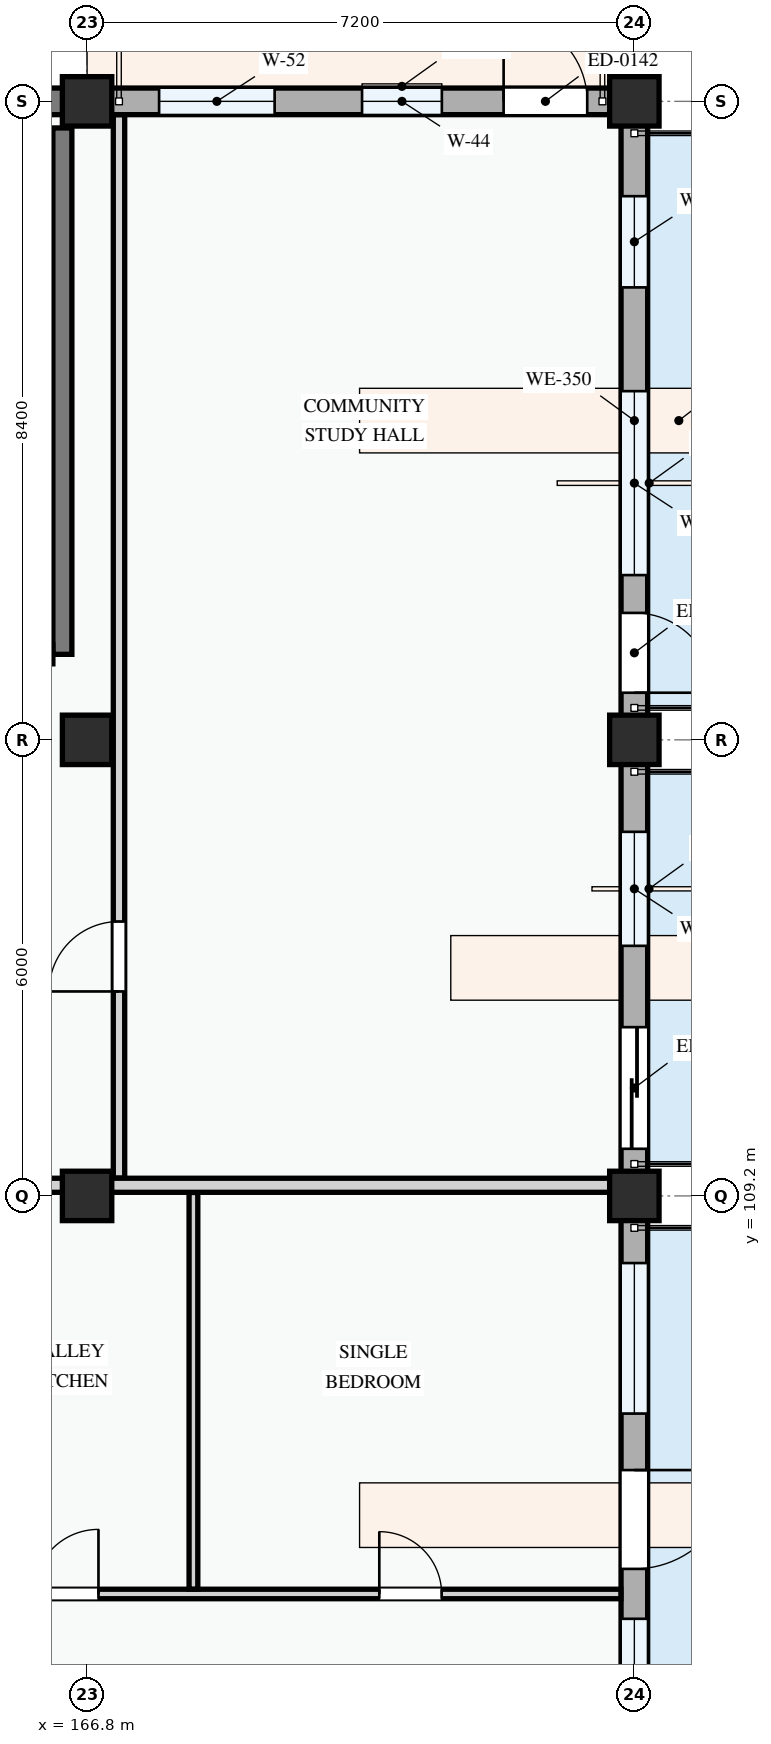
"""IFC4 building model, lengths in metres.
Left out: names, types, materials, properties, quantities, classifications, styles, units other than length and angle.
Written with IfcOpenShell. Run it as: python <this file> out.ifc"""

import sys

from ifc_helpers import new_model, si_unit, direction, frame, frame_2d, origin, origin_2d, place, context, subcontext, project, spatial, rectangle, extrude, element, fill, save


model = new_model("IFC4")
c1 = context("Model", 3, precision=1e-05, world=origin(), true_north=direction((0.0, 1.0)))
c2 = subcontext(c1, "Body", "Model", "MODEL_VIEW")
j1 = project(units=[si_unit("LENGTHUNIT", "METRE"), si_unit("PLANEANGLEUNIT", "RADIAN")], contexts=[c1])
p1 = place(None, origin())
s1 = spatial("IfcSite", under=j1, at=p1, CompositionType="ELEMENT")
p2 = place(p1, origin())
s2 = spatial("IfcBuilding", under=s1, at=p2, CompositionType="ELEMENT")
p3 = place(p2, frame((0.0, 0.0, 11.4)))
s3 = spatial("IfcBuildingStorey", under=s2, at=p3, CompositionType="ELEMENT", Elevation=11.4)
for number, where, z_axis, x_axis in (
    (1, (166.8, 109.2, 0.0), (0.0, 0.0, 1.0), (1.0, 0.0, 0.0)),
    (2, (166.8, 115.2, 0.0), (0.0, 0.0, 1.0), (1.0, 0.0, 0.0)),
    (3, (166.8, 123.6, 0.0), (0.0, 0.0, 1.0), (1.0, 0.0, 0.0)),
    (4, (174.0, 109.2, 0.0), (0.0, 0.0, 1.0), (1.0, 0.0, 0.0)),
    (5, (174.0, 115.2, 0.0), (0.0, 0.0, 1.0), (1.0, 0.0, 0.0)),
    (6, (174.0, 123.6, 0.0), (0.0, 0.0, 1.0), (1.0, 0.0, 0.0)),
):
    element("IfcColumn", number, at=place(p3, frame(where, z_axis=z_axis, x_axis=x_axis)), inside=s3, PredefinedType="COLUMN", context=c2, shape_type="SweptSolid", body=[
        extrude(rectangle(XDim=0.65, YDim=0.65, at=origin_2d()), origin(), (0.0, 0.0, 1.0), 3.3),
    ])
p4 = place(p3, frame((174.0, 109.2, 0.0), z_axis=(0.0, 0.0, 1.0), x_axis=(0.0, 1.0, 0.0)))
e7 = element("IfcWall", 7, at=p4, inside=s3, PredefinedType="STANDARD", context=c2, shape_type="SweptSolid", body=[
    extrude(rectangle(XDim=6.0, YDim=0.35, at=frame_2d((3.0, 0.0))), origin(), (0.0, 0.0, 1.0), 2.575),
])
p5 = place(p4, frame((0.62, 0.0, 0.0)))
e8 = element("IfcOpeningElement", 8, at=p5, cuts=e7, PredefinedType="OPENING", context=c2, shape_type="SweptSolid", body=[
    extrude(rectangle(XDim=1.6, YDim=2.2, at=frame_2d((0.8, 1.1))), frame((0.0, 0.185, 0.0), z_axis=(0.0, -1.0, 0.0), x_axis=(1.0, 0.0, 0.0)), (0.0, 0.0, 1.0), 0.37),
])
p6 = place(p4, frame((3.29, 0.0, 0.78)))
e9 = element("IfcOpeningElement", 9, at=p6, cuts=e7, PredefinedType="OPENING", context=c2, shape_type="SweptSolid", body=[
    extrude(rectangle(XDim=1.5, YDim=1.65, at=frame_2d((0.75, 0.825))), frame((0.0, 0.185, 0.0), z_axis=(0.0, -1.0, 0.0), x_axis=(1.0, 0.0, 0.0)), (0.0, 0.0, 1.0), 0.37),
])
p7 = place(p3, frame((174.0, 115.2, 0.0), z_axis=(0.0, 0.0, 1.0), x_axis=(0.0, 1.0, 0.0)))
e10 = element("IfcWall", 10, at=p7, inside=s3, PredefinedType="STANDARD", context=c2, shape_type="SweptSolid", body=[
    extrude(rectangle(XDim=8.4, YDim=0.35, at=frame_2d((4.2, 0.0))), origin(), (0.0, 0.0, 1.0), 2.425),
])
p8 = place(p7, frame((0.62, 0.0, 0.0)))
e11 = element("IfcOpeningElement", 11, at=p8, cuts=e10, PredefinedType="OPENING", context=c2, shape_type="SweptSolid", body=[
    extrude(rectangle(XDim=1.05, YDim=2.15, at=frame_2d((0.525, 1.075))), frame((0.0, 0.185, 0.0), z_axis=(0.0, -1.0, 0.0), x_axis=(1.0, 0.0, 0.0)), (0.0, 0.0, 1.0), 0.37),
])
p9 = place(p7, frame((2.167, 0.0, 0.78)))
e12 = element("IfcOpeningElement", 12, at=p9, cuts=e10, PredefinedType="OPENING", context=c2, shape_type="SweptSolid", body=[
    extrude(rectangle(XDim=2.42, YDim=1.52, at=frame_2d((1.21, 0.76))), frame((0.0, 0.185, 0.0), z_axis=(0.0, -1.0, 0.0), x_axis=(1.0, 0.0, 0.0)), (0.0, 0.0, 1.0), 0.37),
])
p10 = place(p7, frame((5.952, 0.0, 0.78)))
e13 = element("IfcOpeningElement", 13, at=p10, cuts=e10, PredefinedType="OPENING", context=c2, shape_type="SweptSolid", body=[
    extrude(rectangle(XDim=1.2, YDim=1.35, at=frame_2d((0.6, 0.675))), frame((0.0, 0.185, 0.0), z_axis=(0.0, -1.0, 0.0), x_axis=(1.0, 0.0, 0.0)), (0.0, 0.0, 1.0), 0.37),
])
p11 = place(p3, frame((174.0, 123.6, 0.0), z_axis=(0.0, 0.0, 1.0), x_axis=(-1.0, 0.0, 0.0)))
e14 = element("IfcWall", 14, at=p11, inside=s3, PredefinedType="STANDARD", context=c2, shape_type="SweptSolid", body=[
    extrude(rectangle(XDim=7.2, YDim=0.35, at=frame_2d((3.6, 0.0))), origin(), (0.0, 0.0, 1.0), 2.375),
])
p12 = place(p11, frame((0.62, 0.0, 0.0)))
e15 = element("IfcOpeningElement", 15, at=p12, cuts=e14, PredefinedType="OPENING", context=c2, shape_type="SweptSolid", body=[
    extrude(rectangle(XDim=1.1, YDim=2.15, at=frame_2d((0.55, 1.075))), frame((0.0, 0.185, 0.0), z_axis=(0.0, -1.0, 0.0), x_axis=(1.0, 0.0, 0.0)), (0.0, 0.0, 1.0), 0.37),
])
p13 = place(p11, frame((2.532, 0.0, 0.78)))
e16 = element("IfcOpeningElement", 16, at=p13, cuts=e14, PredefinedType="OPENING", context=c2, shape_type="SweptSolid", body=[
    extrude(rectangle(XDim=1.05, YDim=1.2, at=frame_2d((0.525, 0.6))), frame((0.0, 0.185, 0.0), z_axis=(0.0, -1.0, 0.0), x_axis=(1.0, 0.0, 0.0)), (0.0, 0.0, 1.0), 0.37),
])
p14 = place(p11, frame((4.732, 0.0, 0.78)))
e17 = element("IfcOpeningElement", 17, at=p14, cuts=e14, PredefinedType="OPENING", context=c2, shape_type="SweptSolid", body=[
    extrude(rectangle(XDim=1.52, YDim=1.42, at=frame_2d((0.76, 0.71))), frame((0.0, 0.185, 0.0), z_axis=(0.0, -1.0, 0.0), x_axis=(1.0, 0.0, 0.0)), (0.0, 0.0, 1.0), 0.37),
])
p15 = place(p3, frame((166.8, 123.6, 0.0), z_axis=(0.0, 0.0, 1.0), x_axis=(-1.0, 0.0, 0.0)))
e18 = element("IfcWall", 18, at=p15, inside=s3, PredefinedType="STANDARD", context=c2, shape_type="SweptSolid", body=[
    extrude(rectangle(XDim=0.65, YDim=0.35, at=frame_2d((0.325, 0.0))), origin(), (0.0, 0.0, 1.0), 3.04),
])
p16 = place(p3, frame((174.0, 100.8, 0.0), z_axis=(0.0, 0.0, 1.0), x_axis=(0.0, 1.0, 0.0)))
e19 = element("IfcWall", 19, at=p16, inside=s3, PredefinedType="STANDARD", context=c2, shape_type="SweptSolid", body=[
    extrude(rectangle(XDim=8.4, YDim=0.35, at=frame_2d((4.2, 0.0))), origin(), (0.0, 0.0, 1.0), 2.425),
])
p17 = place(p16, frame((3.493, 0.0, 0.0)))
e20 = element("IfcOpeningElement", 20, at=p17, cuts=e19, PredefinedType="OPENING", context=c2, shape_type="SweptSolid", body=[
    extrude(rectangle(XDim=1.3, YDim=2.15, at=frame_2d((0.65, 1.075))), frame((0.0, 0.185, 0.0), z_axis=(0.0, -1.0, 0.0), x_axis=(1.0, 0.0, 0.0)), (0.0, 0.0, 1.0), 0.37),
])
p18 = place(p16, frame((0.517, 0.0, 0.78)))
e21 = element("IfcOpeningElement", 21, at=p18, cuts=e19, PredefinedType="OPENING", context=c2, shape_type="SweptSolid", body=[
    extrude(rectangle(XDim=2.32, YDim=1.5, at=frame_2d((1.16, 0.75))), frame((0.0, 0.185, 0.0), z_axis=(0.0, -1.0, 0.0), x_axis=(1.0, 0.0, 0.0)), (0.0, 0.0, 1.0), 0.37),
])
p19 = place(p16, frame((5.537, 0.0, 0.78)))
e22 = element("IfcOpeningElement", 22, at=p19, cuts=e19, PredefinedType="OPENING", context=c2, shape_type="SweptSolid", body=[
    extrude(rectangle(XDim=1.98, YDim=1.5, at=frame_2d((0.99, 0.75))), frame((0.0, 0.185, 0.0), z_axis=(0.0, -1.0, 0.0), x_axis=(1.0, 0.0, 0.0)), (0.0, 0.0, 1.0), 0.37),
])
p20 = place(p3, frame((166.475, 123.25, 0.0), z_axis=(0.0, 0.0, 1.0), x_axis=(0.0, -1.0, 0.0)))
e23 = element("IfcWall", 23, at=p20, inside=s3, PredefinedType="SHEAR", context=c2, shape_type="SweptSolid", body=[
    extrude(rectangle(XDim=6.925, YDim=0.25, at=frame_2d((3.462, 0.0))), origin(), (0.0, 0.0, 1.0), 3.0),
])
p21 = place(p3, frame((167.22, 109.435, 0.0), z_axis=(0.0, 0.0, 1.0), x_axis=(0.0, 1.0, 0.0)))
e24 = element("IfcWall", 24, at=p21, inside=s3, PredefinedType="PARTITIONING", context=c2, shape_type="SweptSolid", body=[
    extrude(rectangle(XDim=13.989, YDim=0.15, at=frame_2d((6.994, 0.0))), origin(), (0.0, 0.0, 1.0), 2.425),
])
p22 = place(p21, frame((2.456, 0.0, 0.0)))
e25 = element("IfcOpeningElement", 25, at=p22, cuts=e24, PredefinedType="OPENING", context=c2, shape_type="SweptSolid", body=[
    extrude(rectangle(XDim=0.92, YDim=2.1, at=frame_2d((0.46, 1.05))), frame((0.0, 0.085, 0.0), z_axis=(0.0, -1.0, 0.0), x_axis=(1.0, 0.0, 0.0)), (0.0, 0.0, 1.0), 0.17),
])
p23 = place(p3, frame((162.057, 103.963, 0.0), z_axis=(0.0, 0.0, 1.0), x_axis=(1.0, 0.0, 0.0)))
e26 = element("IfcWall", 26, at=p23, inside=s3, PredefinedType="PARTITIONING", context=c2, shape_type="SweptSolid", body=[
    extrude(rectangle(XDim=11.766, YDim=0.125, at=frame_2d((5.883, 0.0))), origin(), (0.0, 0.0, 1.0), 3.0),
])
p24 = place(p23, frame((0.958, 0.0, 0.0)))
e27 = element("IfcOpeningElement", 27, at=p24, cuts=e26, PredefinedType="OPENING", context=c2, shape_type="SweptSolid", body=[
    extrude(rectangle(XDim=0.8, YDim=2.1, at=frame_2d((0.4, 1.05))), frame((0.0, 0.073, 0.0), z_axis=(0.0, -1.0, 0.0), x_axis=(1.0, 0.0, 0.0)), (0.0, 0.0, 1.0), 0.145),
])
p25 = place(p23, frame((4.043, 0.0, 0.0)))
e28 = element("IfcOpeningElement", 28, at=p25, cuts=e26, PredefinedType="OPENING", context=c2, shape_type="SweptSolid", body=[
    extrude(rectangle(XDim=0.85, YDim=2.1, at=frame_2d((0.425, 1.05))), frame((0.0, 0.073, 0.0), z_axis=(0.0, -1.0, 0.0), x_axis=(1.0, 0.0, 0.0)), (0.0, 0.0, 1.0), 0.145),
])
p26 = place(p23, frame((8.588, 0.0, 0.0)))
e29 = element("IfcOpeningElement", 29, at=p26, cuts=e26, PredefinedType="OPENING", context=c2, shape_type="SweptSolid", body=[
    extrude(rectangle(XDim=0.82, YDim=2.08, at=frame_2d((0.41, 1.04))), frame((0.0, 0.073, 0.0), z_axis=(0.0, -1.0, 0.0), x_axis=(1.0, 0.0, 0.0)), (0.0, 0.0, 1.0), 0.145),
])
p27 = place(p3, frame((168.199, 104.028, 0.0), z_axis=(0.0, 0.0, 1.0), x_axis=(0.0, 1.0, 0.0)))
e30 = element("IfcWall", 30, at=p27, inside=s3, PredefinedType="PARTITIONING", context=c2, shape_type="SweptSolid", body=[
    extrude(rectangle(XDim=5.218, YDim=0.115, at=frame_2d((2.609, 0.0))), origin(), (0.0, 0.0, 1.0), 3.0),
])
p28 = place(p3, frame((162.057, 109.34, 0.0), z_axis=(0.0, 0.0, 1.0), x_axis=(1.0, 0.0, 0.0)))
e31 = element("IfcWall", 31, at=p28, inside=s3, PredefinedType="PARTITIONING", context=c2, shape_type="SweptSolid", body=[
    extrude(rectangle(XDim=11.766, YDim=0.185, at=frame_2d((5.883, 0.0))), origin(), (0.0, 0.0, 1.0), 2.375),
])
p29 = place(p5, frame((1.6, 0.0, 0.0), z_axis=(0.0, 0.0, 1.0), x_axis=(-1.0, 0.0, 0.0)))
e32 = element("IfcDoor", 32, at=p29, inside=s3, OperationType="SLIDING_TO_LEFT", PredefinedType="DOOR", context=c2, shape_type="SweptSolid", body=[
    extrude(rectangle(XDim=1.6, YDim=2.2, at=frame_2d((0.8, 1.1))), frame((0.0, 0.025, 0.0), z_axis=(0.0, -1.0, 0.0), x_axis=(1.0, 0.0, 0.0)), (0.0, 0.0, 1.0), 0.05),
])
fill(e8, e32)
p30 = place(p6, origin())
e33 = element("IfcWindow", 33, at=p30, inside=s3, PartitioningType="SINGLE_PANEL", PredefinedType="WINDOW", context=c2, shape_type="SweptSolid", body=[
    extrude(rectangle(XDim=1.5, YDim=1.65, at=frame_2d((0.75, 0.825))), frame((0.0, 0.03, 0.0), z_axis=(0.0, -1.0, 0.0), x_axis=(1.0, 0.0, 0.0)), (0.0, 0.0, 1.0), 0.06),
])
fill(e9, e33)
p31 = place(p8, frame((1.05, 0.0, 0.0), z_axis=(0.0, 0.0, 1.0), x_axis=(-1.0, 0.0, 0.0)))
e34 = element("IfcDoor", 34, at=p31, inside=s3, OperationType="SINGLE_SWING_RIGHT", PredefinedType="DOOR", context=c2, shape_type="SweptSolid", body=[
    extrude(rectangle(XDim=1.05, YDim=2.15, at=frame_2d((0.525, 1.075))), frame((0.0, 0.025, 0.0), z_axis=(0.0, -1.0, 0.0), x_axis=(1.0, 0.0, 0.0)), (0.0, 0.0, 1.0), 0.05),
])
fill(e11, e34)
p32 = place(p9, origin())
e35 = element("IfcWindow", 35, at=p32, inside=s3, PartitioningType="DOUBLE_PANEL_VERTICAL", PredefinedType="WINDOW", context=c2, shape_type="SweptSolid", body=[
    extrude(rectangle(XDim=2.42, YDim=1.52, at=frame_2d((1.21, 0.76))), frame((0.0, 0.03, 0.0), z_axis=(0.0, -1.0, 0.0), x_axis=(1.0, 0.0, 0.0)), (0.0, 0.0, 1.0), 0.06),
])
fill(e12, e35)
p33 = place(p10, origin())
e36 = element("IfcWindow", 36, at=p33, inside=s3, PartitioningType="SINGLE_PANEL", PredefinedType="WINDOW", context=c2, shape_type="SweptSolid", body=[
    extrude(rectangle(XDim=1.2, YDim=1.35, at=frame_2d((0.6, 0.675))), frame((0.0, 0.03, 0.0), z_axis=(0.0, -1.0, 0.0), x_axis=(1.0, 0.0, 0.0)), (0.0, 0.0, 1.0), 0.06),
])
fill(e13, e36)
p34 = place(p12, frame((1.1, 0.0, 0.0), z_axis=(0.0, 0.0, 1.0), x_axis=(-1.0, 0.0, 0.0)))
e37 = element("IfcDoor", 37, at=p34, inside=s3, OperationType="SINGLE_SWING_LEFT", PredefinedType="DOOR", context=c2, shape_type="SweptSolid", body=[
    extrude(rectangle(XDim=1.1, YDim=2.15, at=frame_2d((0.55, 1.075))), frame((0.0, 0.025, 0.0), z_axis=(0.0, -1.0, 0.0), x_axis=(1.0, 0.0, 0.0)), (0.0, 0.0, 1.0), 0.05),
])
fill(e15, e37)
p35 = place(p13, origin())
e38 = element("IfcWindow", 38, at=p35, inside=s3, PartitioningType="SINGLE_PANEL", PredefinedType="WINDOW", context=c2, shape_type="SweptSolid", body=[
    extrude(rectangle(XDim=1.05, YDim=1.2, at=frame_2d((0.525, 0.6))), frame((0.0, 0.03, 0.0), z_axis=(0.0, -1.0, 0.0), x_axis=(1.0, 0.0, 0.0)), (0.0, 0.0, 1.0), 0.06),
])
fill(e16, e38)
p36 = place(p14, origin())
e39 = element("IfcWindow", 39, at=p36, inside=s3, PartitioningType="SINGLE_PANEL", PredefinedType="WINDOW", context=c2, shape_type="SweptSolid", body=[
    extrude(rectangle(XDim=1.52, YDim=1.42, at=frame_2d((0.76, 0.71))), frame((0.0, 0.03, 0.0), z_axis=(0.0, -1.0, 0.0), x_axis=(1.0, 0.0, 0.0)), (0.0, 0.0, 1.0), 0.06),
])
fill(e17, e39)
p37 = place(p17, frame((1.3, 0.0, 0.0), z_axis=(0.0, 0.0, 1.0), x_axis=(-1.0, 0.0, 0.0)))
e40 = element("IfcDoor", 40, at=p37, inside=s3, OperationType="SINGLE_SWING_LEFT", PredefinedType="DOOR", context=c2, shape_type="SweptSolid", body=[
    extrude(rectangle(XDim=1.3, YDim=2.15, at=frame_2d((0.65, 1.075))), frame((0.0, 0.025, 0.0), z_axis=(0.0, -1.0, 0.0), x_axis=(1.0, 0.0, 0.0)), (0.0, 0.0, 1.0), 0.05),
])
fill(e20, e40)
p38 = place(p18, origin())
e41 = element("IfcWindow", 41, at=p38, inside=s3, PartitioningType="DOUBLE_PANEL_VERTICAL", PredefinedType="WINDOW", context=c2, shape_type="SweptSolid", body=[
    extrude(rectangle(XDim=2.32, YDim=1.5, at=frame_2d((1.16, 0.75))), frame((0.0, 0.03, 0.0), z_axis=(0.0, -1.0, 0.0), x_axis=(1.0, 0.0, 0.0)), (0.0, 0.0, 1.0), 0.06),
])
fill(e21, e41)
p39 = place(p19, origin())
e42 = element("IfcWindow", 42, at=p39, inside=s3, PartitioningType="DOUBLE_PANEL_VERTICAL", PredefinedType="WINDOW", context=c2, shape_type="SweptSolid", body=[
    extrude(rectangle(XDim=1.98, YDim=1.5, at=frame_2d((0.99, 0.75))), frame((0.0, 0.03, 0.0), z_axis=(0.0, -1.0, 0.0), x_axis=(1.0, 0.0, 0.0)), (0.0, 0.0, 1.0), 0.06),
])
fill(e22, e42)
p40 = place(p22, origin())
e43 = element("IfcDoor", 43, at=p40, inside=s3, OperationType="SINGLE_SWING_LEFT", PredefinedType="DOOR", context=c2, shape_type="SweptSolid", body=[
    extrude(rectangle(XDim=0.92, YDim=2.1, at=frame_2d((0.46, 1.05))), frame((0.0, 0.025, 0.0), z_axis=(0.0, -1.0, 0.0), x_axis=(1.0, 0.0, 0.0)), (0.0, 0.0, 1.0), 0.05),
])
fill(e25, e43)
p41 = place(p25, origin())
e44 = element("IfcDoor", 44, at=p41, inside=s3, OperationType="SINGLE_SWING_RIGHT", PredefinedType="DOOR", context=c2, shape_type="SweptSolid", body=[
    extrude(rectangle(XDim=0.85, YDim=2.1, at=frame_2d((0.425, 1.05))), frame((0.0, 0.025, 0.0), z_axis=(0.0, -1.0, 0.0), x_axis=(1.0, 0.0, 0.0)), (0.0, 0.0, 1.0), 0.05),
])
fill(e28, e44)
p42 = place(p26, origin())
e45 = element("IfcDoor", 45, at=p42, inside=s3, OperationType="SINGLE_SWING_LEFT", PredefinedType="DOOR", context=c2, shape_type="SweptSolid", body=[
    extrude(rectangle(XDim=0.82, YDim=2.08, at=frame_2d((0.41, 1.04))), frame((0.0, 0.025, 0.0), z_axis=(0.0, -1.0, 0.0), x_axis=(1.0, 0.0, 0.0)), (0.0, 0.0, 1.0), 0.05),
])
fill(e29, e45)
save(model, sys.argv[1])
